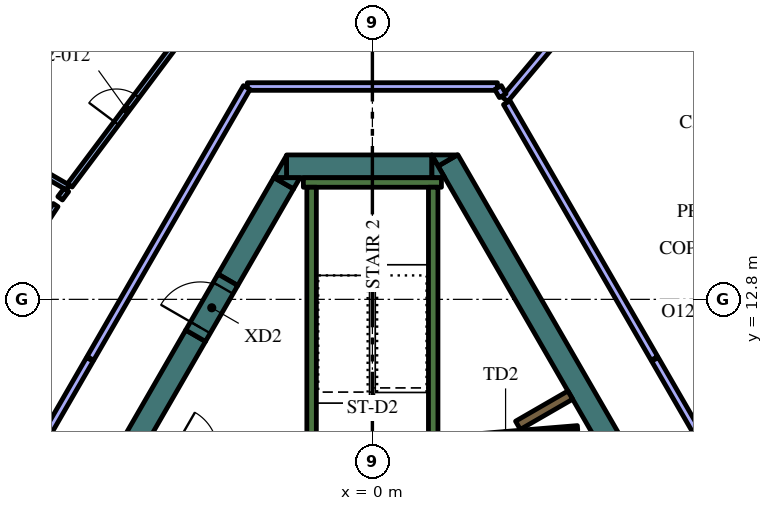
"""IFC4 building model, lengths in metres.
Left out: names, types, materials, properties, quantities, classifications, styles, units other than length and angle.
Written with IfcOpenShell. Run it as: python <this file> out.ifc"""

import sys

from ifc_helpers import new_model, si_unit, direction, frame, frame_2d, origin, place, context, subcontext, project, spatial, polyline, rectangle, outline, extrude, element, fill, save


model = new_model("IFC4")
c1 = context("Model", 3, precision=1e-05, world=origin(), true_north=direction((0.0, 1.0)))
c2 = subcontext(c1, "Body", "Model", "MODEL_VIEW")
j1 = project(units=[si_unit("LENGTHUNIT", "METRE"), si_unit("PLANEANGLEUNIT", "RADIAN")], contexts=[c1])
p1 = place(None, origin())
s1 = spatial("IfcSite", under=j1, at=p1, CompositionType="ELEMENT")
p2 = place(p1, origin())
s2 = spatial("IfcBuilding", under=s1, at=p2, CompositionType="ELEMENT")
p3 = place(p2, frame((0.0, 0.0, 283.8)))
s3 = spatial("IfcBuildingStorey", under=s2, at=p3, CompositionType="ELEMENT", Elevation=283.8)
p4 = place(p3, frame((1.989, 16.456, 0.0), z_axis=(0.0, 0.0, 1.0), x_axis=(0.49999102663, -0.8660305845, 0.0)))
e1 = element("IfcWall", 1, at=p4, inside=s3, PredefinedType="SOLIDWALL", context=c2, shape_type="SweptSolid", body=[
    extrude(rectangle(XDim=12.406, YDim=0.6, at=frame_2d((6.203, 0.0))), origin(), (0.0, 0.0, 1.0), 4.2),
])
p5 = place(p3, origin())
e2 = element("IfcWall", 2, at=p5, inside=s3, PredefinedType="SOLIDWALL", context=c2, shape_type="SweptSolid", body=[
    extrude(outline(polyline([(1.559, 16.6), (2.235, 16.6), (1.728, 16.307), (1.559, 16.6)])), origin(), (0.0, 0.0, 1.0), 4.2),
])
p6 = place(p3, frame((-2.258, 16.3, 0.0), z_axis=(0.0, 0.0, 1.0), x_axis=(1.0, 0.0, 0.0)))
e3 = element("IfcWall", 3, at=p6, inside=s3, PredefinedType="SOLIDWALL", context=c2, shape_type="SweptSolid", body=[
    extrude(rectangle(XDim=3.823, YDim=0.6, at=frame_2d((1.912, 0.0))), origin(), (0.0, 0.0, 1.0), 4.2),
])
e4 = element("IfcWall", 4, at=p5, inside=s3, PredefinedType="SOLIDWALL", context=c2, shape_type="SweptSolid", body=[
    extrude(outline(polyline([(1.905, 16.0), (1.567, 16.0), (1.567, 16.585), (1.905, 16.0)])), origin(), (0.0, 0.0, 1.0), 4.2),
])
e5 = element("IfcWall", 5, at=p5, inside=s3, PredefinedType="SOLIDWALL", context=c2, shape_type="SweptSolid", body=[
    extrude(outline(polyline([(-2.598, 16.0), (-2.26, 16.585), (-2.26, 16.0), (-2.598, 16.0)])), origin(), (0.0, 0.0, 1.0), 4.2),
])
p7 = place(p3, frame((-2.335, 15.855, 0.0), z_axis=(0.0, 0.0, 1.0), x_axis=(-0.499960127962, -0.866048422692, 0.0)))
e6 = element("IfcWall", 6, at=p7, inside=s3, PredefinedType="SOLIDWALL", context=c2, shape_type="SweptSolid", body=[
    extrude(rectangle(XDim=2.934, YDim=0.6, at=frame_2d((1.467, 0.0))), origin(), (0.0, 0.0, 1.0), 4.2),
])
e7 = element("IfcWall", 7, at=p5, inside=s3, PredefinedType="SOLIDWALL", context=c2, shape_type="SweptSolid", body=[
    extrude(outline(polyline([(-1.905, 16.0), (-2.074, 15.707), (-2.581, 16.0), (-1.905, 16.0)])), origin(), (0.0, 0.0, 1.0), 4.2),
])
e8 = element("IfcWall", 8, at=p5, inside=s3, PredefinedType="SOLIDWALL", context=c2, shape_type="SweptSolid", body=[
    extrude(outline(polyline([(-15.502, -6.35), (-4.912, 11.992), (-4.393, 11.692), (-10.815, 0.569), (-10.84, 0.583), (-10.84, 0.583), (-10.84, 0.583), (-10.965, 0.367), (-10.965, 0.367), (-10.965, 0.367), (-10.94, 0.352), (-11.033, 0.191), (-14.809, -6.35), (-15.156, -6.95), (-15.502, -6.35)])), origin(), (0.0, 0.0, 1.0), 4.2),
])
p8 = place(p3, frame((-1.817, 15.875, 0.0), z_axis=(0.0, 0.0, 1.0), x_axis=(1.0, 0.0, 0.0)))
e9 = element("IfcWall", 9, at=p8, inside=s3, PredefinedType="SOLIDWALL", context=c2, shape_type="SweptSolid", body=[
    extrude(rectangle(XDim=3.634, YDim=0.25, at=frame_2d((1.817, 0.0))), origin(), (0.0, 0.0, 1.0), 4.2),
])
p9 = place(p3, frame((1.6, 8.95, 0.0), z_axis=(0.0, 0.0, 1.0), x_axis=(0.0, 1.0, 0.0)))
e10 = element("IfcWall", 10, at=p9, inside=s3, PredefinedType="SOLIDWALL", context=c2, shape_type="SweptSolid", body=[
    extrude(rectangle(XDim=6.8, YDim=0.25, at=frame_2d((3.4, 0.0))), origin(), (0.0, 0.0, 1.0), 4.2),
])
p10 = place(p3, frame((-1.6, 8.7, 0.0), z_axis=(0.0, 0.0, 1.0), x_axis=(0.0, 1.0, 0.0)))
e11 = element("IfcWall", 11, at=p10, inside=s3, PredefinedType="SOLIDWALL", context=c2, shape_type="SweptSolid", body=[
    extrude(rectangle(XDim=7.05, YDim=0.25, at=frame_2d((3.525, 0.0))), origin(), (0.0, 0.0, 1.0), 4.2),
])
p11 = place(p3, frame((3.83, 9.486, 0.0), z_axis=(0.0, 0.0, 1.0), x_axis=(0.865986202621, 0.500067892261, 0.0)))
e12 = element("IfcWall", 12, at=p11, inside=s3, PredefinedType="SOLIDWALL", context=c2, shape_type="SweptSolid", body=[
    extrude(rectangle(XDim=1.591, YDim=0.25, at=frame_2d((0.795, 0.0))), origin(), (0.0, 0.0, 1.0), 4.2),
])
p12 = place(p3, frame((5.398, 9.419, 0.0), z_axis=(0.0, 0.0, 1.0), x_axis=(-0.996653416376, -0.081743303248, 0.0)))
e13 = element("IfcWall", 13, at=p12, inside=s3, PredefinedType="PARTITIONING", context=c2, shape_type="SweptSolid", body=[
    extrude(rectangle(XDim=2.7, YDim=0.12, at=frame_2d((1.35, 0.0))), origin(), (0.0, 0.0, 1.0), 3.55),
])
p13 = place(p12, frame((1.45, 0.0, 0.0)))
e14 = element("IfcOpeningElement", 14, at=p13, cuts=e13, PredefinedType="OPENING", context=c2, shape_type="SweptSolid", body=[
    extrude(rectangle(XDim=0.9, YDim=2.1, at=frame_2d((0.45, 1.05))), frame((0.0, 0.07, 0.0), z_axis=(0.0, -1.0, 0.0), x_axis=(1.0, 0.0, 0.0)), (0.0, 0.0, 1.0), 0.14),
])
p14 = place(p3, frame((-4.652, 11.842, 0.0), z_axis=(0.0, 0.0, 1.0), x_axis=(0.500062241894, 0.865989465428, 0.0)))
e15 = element("IfcWall", 15, at=p14, inside=s3, PredefinedType="SOLIDWALL", context=c2, shape_type="SweptSolid", body=[
    extrude(rectangle(XDim=1.7, YDim=0.6, at=frame_2d((0.85, 0.0))), origin(), (0.0, 0.0, 1.0), 4.2),
])
p15 = place(p14, frame((0.25, 0.0, 0.0)))
e16 = element("IfcOpeningElement", 16, at=p15, cuts=e15, PredefinedType="OPENING", context=c2, shape_type="SweptSolid", body=[
    extrude(rectangle(XDim=1.2, YDim=2.1, at=frame_2d((0.6, 1.05))), frame((0.0, 0.31, 0.0), z_axis=(0.0, -1.0, 0.0), x_axis=(1.0, 0.0, 0.0)), (0.0, 0.0, 1.0), 0.62),
])
p16 = place(p3, frame((3.483, 18.067, 0.0), z_axis=(0.0, 0.0, 1.0), x_axis=(0.642896944312, 0.765952687177, 0.0)))
e17 = element("IfcWall", 17, at=p16, inside=s3, PredefinedType="PARTITIONING", context=c2, shape_type="SweptSolid", body=[
    extrude(rectangle(XDim=2.29, YDim=0.2, at=frame_2d((1.145, 0.0))), origin(), (0.0, 0.0, 1.0), 3.55),
])
p17 = place(p3, frame((8.792, 8.873, 0.0), z_axis=(0.0, 0.0, 1.0), x_axis=(-0.499992600721, 0.866029675718, 0.0)))
e18 = element("IfcWall", 18, at=p17, inside=s3, PredefinedType="PARTITIONING", context=c2, shape_type="SweptSolid", body=[
    extrude(rectangle(XDim=2.712, YDim=0.2, at=frame_2d((1.356, 0.0))), origin(), (0.0, 0.0, 1.0), 3.55),
])
p18 = place(p3, frame((7.421, 11.247, 0.0), z_axis=(0.0, 0.0, 1.0), x_axis=(-0.499999024953, 0.866025966727, 0.0)))
e19 = element("IfcWall", 19, at=p18, inside=s3, PredefinedType="PARTITIONING", context=c2, shape_type="SweptSolid", body=[
    extrude(rectangle(XDim=7.769, YDim=0.2, at=frame_2d((3.884, 0.0))), origin(), (0.0, 0.0, 1.0), 3.55),
])
p19 = place(p3, frame((-8.007, 15.74, 0.0), z_axis=(0.0, 0.0, 1.0), x_axis=(-0.866044607523, 0.499966736674, 0.0)))
e20 = element("IfcWall", 20, at=p19, inside=s3, PredefinedType="PARTITIONING", context=c2, shape_type="SweptSolid", body=[
    extrude(rectangle(XDim=3.115, YDim=0.15, at=frame_2d((1.557, 0.0))), origin(), (0.0, 0.0, 1.0), 3.55),
])
p20 = place(p3, frame((-7.962, 15.8, 0.0), z_axis=(0.0, 0.0, 1.0), x_axis=(0.599541489613, 0.800343677574, 0.0)))
e21 = element("IfcWall", 21, at=p20, inside=s3, PredefinedType="PARTITIONING", context=c2, shape_type="SweptSolid", body=[
    extrude(rectangle(XDim=4.942, YDim=0.15, at=frame_2d((2.471, 0.0))), origin(), (0.0, 0.0, 1.0), 3.55),
])
p21 = place(p20, frame((2.042, 0.0, 0.0)))
e22 = element("IfcOpeningElement", 22, at=p21, cuts=e21, PredefinedType="OPENING", context=c2, shape_type="SweptSolid", body=[
    extrude(rectangle(XDim=0.9, YDim=2.1, at=frame_2d((0.45, 1.05))), frame((0.0, 0.085, 0.0), z_axis=(0.0, -1.0, 0.0), x_axis=(1.0, 0.0, 0.0)), (0.0, 0.0, 1.0), 0.17),
])
p22 = place(p3, frame((-8.052, 15.679, 0.0), z_axis=(0.0, 0.0, 1.0), x_axis=(-0.599004157744, -0.800745914136, 0.0)))
e23 = element("IfcWall", 23, at=p22, inside=s3, PredefinedType="PARTITIONING", context=c2, shape_type="SweptSolid", body=[
    extrude(rectangle(XDim=0.275, YDim=0.15, at=frame_2d((0.137, 0.0))), origin(), (0.0, 0.0, 1.0), 3.55),
])
p23 = place(p3, frame((-11.523, 10.449, 0.0), z_axis=(0.0, 0.0, 1.0), x_axis=(0.550751709023, 0.834669129061, 0.0)))
e24 = element("IfcWall", 24, at=p23, inside=s3, PredefinedType="PARTITIONING", context=c2, shape_type="SweptSolid", body=[
    extrude(rectangle(XDim=5.788, YDim=0.15, at=frame_2d((2.894, 0.0))), origin(), (0.0, 0.0, 1.0), 3.55),
])
p24 = place(p23, frame((2.488, 0.0, 0.0)))
e25 = element("IfcOpeningElement", 25, at=p24, cuts=e24, PredefinedType="OPENING", context=c2, shape_type="SweptSolid", body=[
    extrude(rectangle(XDim=0.9, YDim=2.1, at=frame_2d((0.45, 1.05))), frame((0.0, 0.085, 0.0), z_axis=(0.0, -1.0, 0.0), x_axis=(1.0, 0.0, 0.0)), (0.0, 0.0, 1.0), 0.17),
])
p25 = place(p3, frame((-7.436, 11.221, 0.0), z_axis=(0.0, 0.0, 1.0), x_axis=(-0.49999894854, -0.866026010844, 0.0)))
e26 = element("IfcWall", 26, at=p25, inside=s3, PredefinedType="PARTITIONING", context=c2, shape_type="SweptSolid", body=[
    extrude(rectangle(XDim=12.0, YDim=0.2, at=frame_2d((6.0, 0.0))), origin(), (0.0, 0.0, 1.0), 3.55),
])
p26 = place(p25, frame((5.5, 0.0, 0.0)))
e27 = element("IfcOpeningElement", 27, at=p26, cuts=e26, PredefinedType="OPENING", context=c2, shape_type="SweptSolid", body=[
    extrude(rectangle(XDim=1.0, YDim=2.1, at=frame_2d((0.5, 1.05))), frame((0.0, 0.11, 0.0), z_axis=(0.0, -1.0, 0.0), x_axis=(1.0, 0.0, 0.0)), (0.0, 0.0, 1.0), 0.22),
])
p27 = place(p3, frame((3.291, 18.4, 0.0), z_axis=(0.0, 0.0, 1.0), x_axis=(-1.0, 0.0, 0.0)))
e28 = element("IfcWall", 28, at=p27, inside=s3, PredefinedType="PARTITIONING", context=c2, shape_type="SweptSolid", body=[
    extrude(rectangle(XDim=6.582, YDim=0.2, at=frame_2d((3.291, 0.0))), origin(), (0.0, 0.0, 1.0), 3.55),
])
p28 = place(p3, frame((-3.306, 18.374, 0.0), z_axis=(0.0, 0.0, 1.0), x_axis=(-0.499999798456, -0.866025520146, 0.0)))
e29 = element("IfcWall", 29, at=p28, inside=s3, PredefinedType="PARTITIONING", context=c2, shape_type="SweptSolid", body=[
    extrude(rectangle(XDim=8.229, YDim=0.2, at=frame_2d((4.115, 0.0))), origin(), (0.0, 0.0, 1.0), 3.55),
])
p29 = place(p3, frame((3.43, 18.159, 0.0), z_axis=(0.0, 0.0, 1.0), x_axis=(-0.499949632511, 0.866054481515, 0.0)))
e30 = element("IfcWall", 30, at=p29, inside=s3, PredefinedType="PARTITIONING", context=c2, shape_type="SweptSolid", body=[
    extrude(rectangle(XDim=0.248, YDim=0.2, at=frame_2d((0.124, 0.0))), origin(), (0.0, 0.0, 1.0), 3.55),
])
p30 = place(p3, frame((10.938, 17.99, 0.0), z_axis=(0.0, 0.0, 1.0), x_axis=(-0.599559865294, 0.800329911929, 0.0)))
e31 = element("IfcWall", 31, at=p30, inside=s3, PredefinedType="SOLIDWALL", context=c2, shape_type="SweptSolid", body=[
    extrude(rectangle(XDim=5.415, YDim=0.19, at=frame_2d((2.708, 0.0))), origin(), (0.0, 0.0, 1.0), 3.95),
])
p31 = place(p30, frame((0.358, 0.0, 0.6)))
e32 = element("IfcOpeningElement", 32, at=p31, cuts=e31, PredefinedType="OPENING", context=c2, shape_type="SweptSolid", body=[
    extrude(rectangle(XDim=1.5, YDim=2.85, at=frame_2d((0.75, 1.425))), frame((0.0, 0.105, 0.0), z_axis=(0.0, -1.0, 0.0), x_axis=(1.0, 0.0, 0.0)), (0.0, 0.0, 1.0), 0.21),
])
p32 = place(p30, frame((3.593, 0.0, 0.6)))
e33 = element("IfcOpeningElement", 33, at=p32, cuts=e31, PredefinedType="OPENING", context=c2, shape_type="SweptSolid", body=[
    extrude(rectangle(XDim=1.5, YDim=2.85, at=frame_2d((0.75, 1.425))), frame((0.0, 0.105, 0.0), z_axis=(0.0, -1.0, 0.0), x_axis=(1.0, 0.0, 0.0)), (0.0, 0.0, 1.0), 0.21),
])
p33 = place(p3, frame((-7.692, 22.324, 0.0), z_axis=(0.0, 0.0, 1.0), x_axis=(-0.599559865294, -0.800329911929, 0.0)))
e34 = element("IfcWall", 34, at=p33, inside=s3, PredefinedType="SOLIDWALL", context=c2, shape_type="SweptSolid", body=[
    extrude(rectangle(XDim=5.415, YDim=0.19, at=frame_2d((2.708, 0.0))), origin(), (0.0, 0.0, 1.0), 3.95),
])
p34 = place(p33, frame((0.323, 0.0, 0.6)))
e35 = element("IfcOpeningElement", 35, at=p34, cuts=e34, PredefinedType="OPENING", context=c2, shape_type="SweptSolid", body=[
    extrude(rectangle(XDim=1.5, YDim=2.85, at=frame_2d((0.75, 1.425))), frame((0.0, 0.105, 0.0), z_axis=(0.0, -1.0, 0.0), x_axis=(1.0, 0.0, 0.0)), (0.0, 0.0, 1.0), 0.21),
])
p35 = place(p33, frame((3.558, 0.0, 0.6)))
e36 = element("IfcOpeningElement", 36, at=p35, cuts=e34, PredefinedType="OPENING", context=c2, shape_type="SweptSolid", body=[
    extrude(rectangle(XDim=1.5, YDim=2.85, at=frame_2d((0.75, 1.425))), frame((0.0, 0.105, 0.0), z_axis=(0.0, -1.0, 0.0), x_axis=(1.0, 0.0, 0.0)), (0.0, 0.0, 1.0), 0.21),
])
p36 = place(p13, origin())
e37 = element("IfcDoor", 37, at=p36, inside=s3, OperationType="SINGLE_SWING_LEFT", PredefinedType="DOOR", context=c2, shape_type="SweptSolid", body=[
    extrude(rectangle(XDim=0.9, YDim=2.1, at=frame_2d((0.45, 1.05))), frame((0.0, 0.025, 0.0), z_axis=(0.0, -1.0, 0.0), x_axis=(1.0, 0.0, 0.0)), (0.0, 0.0, 1.0), 0.05),
])
fill(e14, e37)
p37 = place(p15, origin())
e38 = element("IfcDoor", 38, at=p37, inside=s3, OperationType="SINGLE_SWING_LEFT", PredefinedType="DOOR", context=c2, shape_type="SweptSolid", body=[
    extrude(rectangle(XDim=1.2, YDim=2.1, at=frame_2d((0.6, 1.05))), frame((0.0, 0.025, 0.0), z_axis=(0.0, -1.0, 0.0), x_axis=(1.0, 0.0, 0.0)), (0.0, 0.0, 1.0), 0.05),
])
fill(e16, e38)
p38 = place(p21, origin())
e39 = element("IfcDoor", 39, at=p38, inside=s3, OperationType="SINGLE_SWING_RIGHT", PredefinedType="DOOR", context=c2, shape_type="SweptSolid", body=[
    extrude(rectangle(XDim=0.9, YDim=2.1, at=frame_2d((0.45, 1.05))), frame((0.0, 0.025, 0.0), z_axis=(0.0, -1.0, 0.0), x_axis=(1.0, 0.0, 0.0)), (0.0, 0.0, 1.0), 0.05),
])
fill(e22, e39)
save(model, sys.argv[1])
